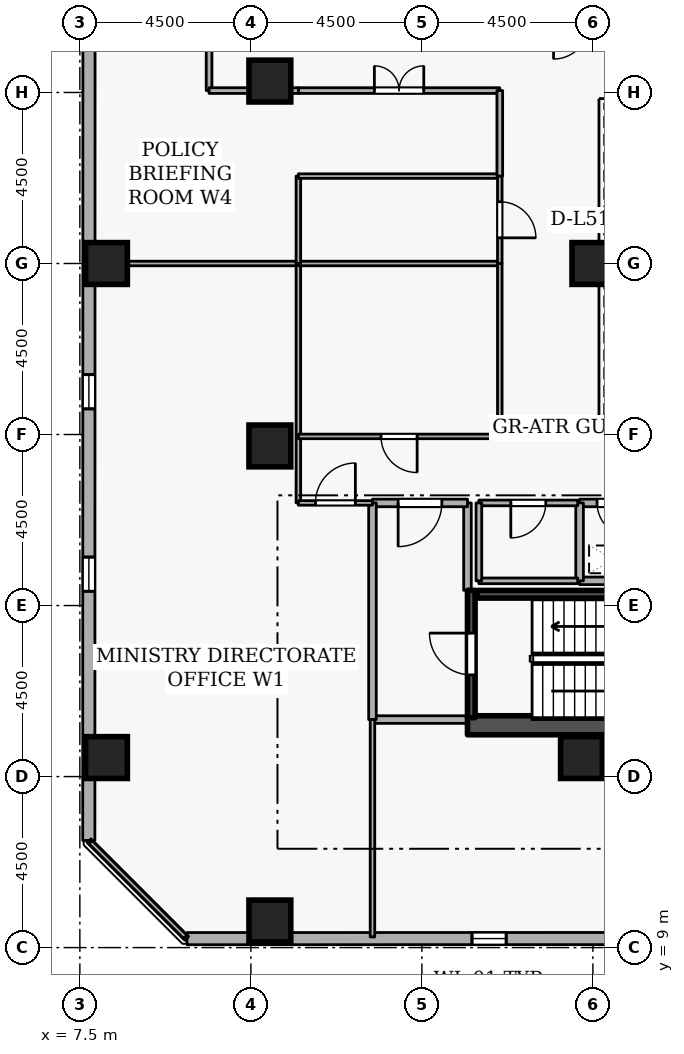
"""IFC4 building model, lengths in metres.
Left out: names, types, materials, properties, quantities, classifications, styles, units other than length and angle.
Written with IfcOpenShell. Run it as: python <this file> out.ifc"""

import sys

from ifc_helpers import new_model, si_unit, direction, frame, frame_2d, origin, origin_2d, place, context, subcontext, project, spatial, rectangle, extrude, element, fill, save


model = new_model("IFC4")
c1 = context("Model", 3, precision=1e-05, world=origin(), true_north=direction((0.0, 1.0)))
c2 = subcontext(c1, "Body", "Model", "MODEL_VIEW")
j1 = project(units=[si_unit("LENGTHUNIT", "METRE"), si_unit("PLANEANGLEUNIT", "RADIAN")], contexts=[c1])
p1 = place(None, origin())
s1 = spatial("IfcSite", under=j1, at=p1, CompositionType="ELEMENT")
p2 = place(p1, origin())
s2 = spatial("IfcBuilding", under=s1, at=p2, CompositionType="ELEMENT")
p3 = place(p2, frame((0.0, 0.0, 192.9)))
s3 = spatial("IfcBuildingStorey", under=s2, at=p3, CompositionType="ELEMENT", Elevation=192.9)
p4 = place(p3, frame((17.7, 14.85, 0.0), z_axis=(0.0, 0.0, 1.0), x_axis=(1.0, 0.0, 0.0)))
e1 = element("IfcWall", 1, at=p4, inside=s3, PredefinedType="SHEAR", context=c2, shape_type="SweptSolid", body=[
    extrude(rectangle(XDim=15.6, YDim=0.5, at=frame_2d((7.8, 0.0))), origin(), (0.0, 0.0, 1.0), 3.6),
])
for number, where, z_axis, x_axis in (
    (2, (12.5, 9.7, 0.0), (0.0, 0.0, 1.0), (1.0, 0.0, 0.0)),
    (3, (8.2, 14.0, 0.0), (0.0, 0.0, 1.0), (1.0, 0.0, 0.0)),
    (4, (8.2, 27.0, 0.0), (0.0, 0.0, 1.0), (1.0, 0.0, 0.0)),
    (5, (12.5, 22.2, 0.0), (0.0, 0.0, 1.0), (1.0, 0.0, 0.0)),
    (6, (12.5, 31.8, 0.0), (0.0, 0.0, 1.0), (1.0, 0.0, 0.0)),
    (7, (20.7, 14.0, 0.0), (0.0, 0.0, 1.0), (1.0, 0.0, 0.0)),
    (8, (21.0, 27.0, 0.0), (0.0, 0.0, 1.0), (1.0, 0.0, 0.0)),
):
    element("IfcColumn", number, at=place(p3, frame(where, z_axis=z_axis, x_axis=x_axis)), inside=s3, PredefinedType="COLUMN", context=c2, shape_type="SweptSolid", body=[
        extrude(rectangle(XDim=1.1, YDim=1.1, at=origin_2d()), origin(), (0.0, 0.0, 1.0), 3.6),
    ])
p5 = place(p3, frame((10.319, 9.235, 0.0), z_axis=(0.0, 0.0, 1.0), x_axis=(0.99999997701, 0.000214431216, 0.0)))
e9 = element("IfcWall", 9, at=p5, inside=s3, PredefinedType="STANDARD", context=c2, shape_type="SweptSolid", body=[
    extrude(rectangle(XDim=34.156, YDim=0.32, at=frame_2d((17.078, 0.0))), origin(), (0.0, 0.0, 1.0), 2.7),
])
p6 = place(p5, frame((7.5, 0.0, 0.72)))
e10 = element("IfcOpeningElement", 10, at=p6, cuts=e9, PredefinedType="OPENING", context=c2, shape_type="SweptSolid", body=[
    extrude(rectangle(XDim=0.9, YDim=1.75, at=frame_2d((0.45, 0.875))), frame((0.0, 0.17, 0.0), z_axis=(0.0, -1.0, 0.0), x_axis=(1.0, 0.0, 0.0)), (0.0, 0.0, 1.0), 0.34),
])
p7 = place(p5, frame((12.3, 0.0, 0.72)))
e11 = element("IfcOpeningElement", 11, at=p7, cuts=e9, PredefinedType="OPENING", context=c2, shape_type="SweptSolid", body=[
    extrude(rectangle(XDim=0.9, YDim=1.75, at=frame_2d((0.45, 0.875))), frame((0.0, 0.17, 0.0), z_axis=(0.0, -1.0, 0.0), x_axis=(1.0, 0.0, 0.0)), (0.0, 0.0, 1.0), 0.34),
])
p8 = place(p5, frame((17.1, 0.0, 0.72)))
e12 = element("IfcOpeningElement", 12, at=p8, cuts=e9, PredefinedType="OPENING", context=c2, shape_type="SweptSolid", body=[
    extrude(rectangle(XDim=0.9, YDim=1.75, at=frame_2d((0.45, 0.875))), frame((0.0, 0.17, 0.0), z_axis=(0.0, -1.0, 0.0), x_axis=(1.0, 0.0, 0.0)), (0.0, 0.0, 1.0), 0.34),
])
p9 = place(p5, frame((21.9, 0.0, 0.72)))
e13 = element("IfcOpeningElement", 13, at=p9, cuts=e9, PredefinedType="OPENING", context=c2, shape_type="SweptSolid", body=[
    extrude(rectangle(XDim=0.9, YDim=1.75, at=frame_2d((0.45, 0.875))), frame((0.0, 0.17, 0.0), z_axis=(0.0, -1.0, 0.0), x_axis=(1.0, 0.0, 0.0)), (0.0, 0.0, 1.0), 0.34),
])
p10 = place(p5, frame((31.5, 0.0, 0.72)))
e14 = element("IfcOpeningElement", 14, at=p10, cuts=e9, PredefinedType="OPENING", context=c2, shape_type="SweptSolid", body=[
    extrude(rectangle(XDim=0.9, YDim=1.75, at=frame_2d((0.45, 0.875))), frame((0.0, 0.17, 0.0), z_axis=(0.0, -1.0, 0.0), x_axis=(1.0, 0.0, 0.0)), (0.0, 0.0, 1.0), 0.34),
])
p11 = place(p3, frame((7.743, 45.975, 0.0), z_axis=(0.0, 0.0, 1.0), x_axis=(-0.000214431216, -0.99999997701, 0.0)))
e15 = element("IfcWall", 15, at=p11, inside=s3, PredefinedType="STANDARD", context=c2, shape_type="SweptSolid", body=[
    extrude(rectangle(XDim=34.156, YDim=0.32, at=frame_2d((17.078, 0.0))), origin(), (0.0, 0.0, 1.0), 2.7),
])
p12 = place(p11, frame((2.7, 0.0, 0.72)))
e16 = element("IfcOpeningElement", 16, at=p12, cuts=e15, PredefinedType="OPENING", context=c2, shape_type="SweptSolid", body=[
    extrude(rectangle(XDim=0.9, YDim=1.75, at=frame_2d((0.45, 0.875))), frame((0.0, 0.17, 0.0), z_axis=(0.0, -1.0, 0.0), x_axis=(1.0, 0.0, 0.0)), (0.0, 0.0, 1.0), 0.34),
])
p13 = place(p11, frame((7.5, 0.0, 0.72)))
e17 = element("IfcOpeningElement", 17, at=p13, cuts=e15, PredefinedType="OPENING", context=c2, shape_type="SweptSolid", body=[
    extrude(rectangle(XDim=0.9, YDim=1.75, at=frame_2d((0.45, 0.875))), frame((0.0, 0.17, 0.0), z_axis=(0.0, -1.0, 0.0), x_axis=(1.0, 0.0, 0.0)), (0.0, 0.0, 1.0), 0.34),
])
p14 = place(p11, frame((12.3, 0.0, 0.72)))
e18 = element("IfcOpeningElement", 18, at=p14, cuts=e15, PredefinedType="OPENING", context=c2, shape_type="SweptSolid", body=[
    extrude(rectangle(XDim=0.9, YDim=1.75, at=frame_2d((0.45, 0.875))), frame((0.0, 0.17, 0.0), z_axis=(0.0, -1.0, 0.0), x_axis=(1.0, 0.0, 0.0)), (0.0, 0.0, 1.0), 0.34),
])
p15 = place(p11, frame((21.9, 0.0, 0.72)))
e19 = element("IfcOpeningElement", 19, at=p15, cuts=e15, PredefinedType="OPENING", context=c2, shape_type="SweptSolid", body=[
    extrude(rectangle(XDim=0.9, YDim=1.75, at=frame_2d((0.45, 0.875))), frame((0.0, 0.17, 0.0), z_axis=(0.0, -1.0, 0.0), x_axis=(1.0, 0.0, 0.0)), (0.0, 0.0, 1.0), 0.34),
])
p16 = place(p11, frame((26.7, 0.0, 0.72)))
e20 = element("IfcOpeningElement", 20, at=p16, cuts=e15, PredefinedType="OPENING", context=c2, shape_type="SweptSolid", body=[
    extrude(rectangle(XDim=0.9, YDim=1.75, at=frame_2d((0.45, 0.875))), frame((0.0, 0.17, 0.0), z_axis=(0.0, -1.0, 0.0), x_axis=(1.0, 0.0, 0.0)), (0.0, 0.0, 1.0), 0.34),
])
p17 = place(p3, frame((17.8, 15.05, 0.0), z_axis=(0.0, 0.0, 1.0), x_axis=(0.0, 1.0, 0.0)))
e21 = element("IfcWall", 21, at=p17, inside=s3, PredefinedType="SHEAR", context=c2, shape_type="SweptSolid", body=[
    extrude(rectangle(XDim=3.35, YDim=0.2, at=frame_2d((1.675, 0.0))), origin(), (0.0, 0.0, 1.0), 3.6),
])
p18 = place(p17, frame((1.125, 0.0, 0.0)))
e22 = element("IfcOpeningElement", 22, at=p18, cuts=e21, PredefinedType="OPENING", context=c2, shape_type="SweptSolid", body=[
    extrude(rectangle(XDim=1.1, YDim=2.1, at=frame_2d((0.55, 1.05))), frame((0.0, 0.11, 0.0), z_axis=(0.0, -1.0, 0.0), x_axis=(1.0, 0.0, 0.0)), (0.0, 0.0, 1.0), 0.22),
])
p19 = place(p3, frame((25.05, 18.297, 0.0), z_axis=(0.0, 0.0, 1.0), x_axis=(-1.0, 0.0, 0.0)))
e23 = element("IfcWall", 23, at=p19, inside=s3, PredefinedType="SHEAR", context=c2, shape_type="SweptSolid", body=[
    extrude(rectangle(XDim=7.1, YDim=0.2, at=frame_2d((3.55, 0.0))), origin(), (0.0, 0.0, 1.0), 3.6),
])
p20 = place(p3, frame((15.2, 15.0, 0.0), z_axis=(0.0, 0.0, 1.0), x_axis=(1.0, 0.0, 0.0)))
e24 = element("IfcWall", 24, at=p20, inside=s3, PredefinedType="STANDARD", context=c2, shape_type="SweptSolid", body=[
    extrude(rectangle(XDim=2.5, YDim=0.2, at=frame_2d((1.25, 0.0))), origin(), (0.0, 0.0, 1.0), 3.34),
])
p21 = place(p3, frame((17.7, 18.4, 0.0), z_axis=(0.0, 0.0, 1.0), x_axis=(0.0, 1.0, 0.0)))
e25 = element("IfcWall", 25, at=p21, inside=s3, PredefinedType="STANDARD", context=c2, shape_type="SweptSolid", body=[
    extrude(rectangle(XDim=2.3, YDim=0.2, at=frame_2d((1.15, 0.0))), origin(), (0.0, 0.0, 1.0), 2.545),
])
p22 = place(p3, frame((17.7, 20.7, 0.0), z_axis=(0.0, 0.0, 1.0), x_axis=(-1.0, 0.0, 0.0)))
e26 = element("IfcWall", 26, at=p22, inside=s3, PredefinedType="STANDARD", context=c2, shape_type="SweptSolid", body=[
    extrude(rectangle(XDim=2.5, YDim=0.2, at=frame_2d((1.25, 0.0))), origin(), (0.0, 0.0, 1.0), 3.34),
])
p23 = place(p22, frame((0.675, 0.0, 0.0)))
e27 = element("IfcOpeningElement", 27, at=p23, cuts=e26, PredefinedType="OPENING", context=c2, shape_type="SweptSolid", body=[
    extrude(rectangle(XDim=1.15, YDim=2.1, at=frame_2d((0.575, 1.05))), frame((0.0, 0.11, 0.0), z_axis=(0.0, -1.0, 0.0), x_axis=(1.0, 0.0, 0.0)), (0.0, 0.0, 1.0), 0.22),
])
p24 = place(p3, frame((15.2, 20.7, 0.0), z_axis=(0.0, 0.0, 1.0), x_axis=(0.0, -1.0, 0.0)))
e28 = element("IfcWall", 28, at=p24, inside=s3, PredefinedType="STANDARD", context=c2, shape_type="SweptSolid", body=[
    extrude(rectangle(XDim=5.7, YDim=0.2, at=frame_2d((2.85, 0.0))), origin(), (0.0, 0.0, 1.0), 3.34),
])
p25 = place(p3, frame((20.65, 18.65, 0.0), z_axis=(0.0, 0.0, 1.0), x_axis=(1.0, 0.0, 0.0)))
e29 = element("IfcWall", 29, at=p25, inside=s3, PredefinedType="STANDARD", context=c2, shape_type="SweptSolid", body=[
    extrude(rectangle(XDim=1.8, YDim=0.2, at=frame_2d((0.9, 0.0))), origin(), (0.0, 0.0, 1.0), 3.34),
])
p26 = place(p3, frame((22.45, 20.7, 0.0), z_axis=(0.0, 0.0, 1.0), x_axis=(-1.0, 0.0, 0.0)))
e30 = element("IfcWall", 30, at=p26, inside=s3, PredefinedType="STANDARD", context=c2, shape_type="SweptSolid", body=[
    extrude(rectangle(XDim=1.8, YDim=0.2, at=frame_2d((0.9, 0.0))), origin(), (0.0, 0.0, 1.0), 3.34),
])
p27 = place(p26, frame((0.46, 0.0, 0.0)))
e31 = element("IfcOpeningElement", 31, at=p27, cuts=e30, PredefinedType="OPENING", context=c2, shape_type="SweptSolid", body=[
    extrude(rectangle(XDim=0.88, YDim=2.04, at=frame_2d((0.44, 1.02))), frame((0.0, 0.11, 0.0), z_axis=(0.0, -1.0, 0.0), x_axis=(1.0, 0.0, 0.0)), (0.0, 0.0, 1.0), 0.22),
])
p28 = place(p3, frame((20.65, 20.7, 0.0), z_axis=(0.0, 0.0, 1.0), x_axis=(0.0, -1.0, 0.0)))
e32 = element("IfcWall", 32, at=p28, inside=s3, PredefinedType="STANDARD", context=c2, shape_type="SweptSolid", body=[
    extrude(rectangle(XDim=2.05, YDim=0.2, at=frame_2d((1.025, 0.0))), origin(), (0.0, 0.0, 1.0), 3.34),
])
p29 = place(p3, frame((18.0, 18.65, 0.0), z_axis=(0.0, 0.0, 1.0), x_axis=(1.0, 0.0, 0.0)))
e33 = element("IfcWall", 33, at=p29, inside=s3, PredefinedType="PARTITIONING", context=c2, shape_type="SweptSolid", body=[
    extrude(rectangle(XDim=2.6, YDim=0.15, at=frame_2d((1.3, 0.0))), origin(), (0.0, 0.0, 1.0), 3.34),
])
p30 = place(p3, frame((20.6, 20.7, 0.0), z_axis=(0.0, 0.0, 1.0), x_axis=(-1.0, 0.0, 0.0)))
e34 = element("IfcWall", 34, at=p30, inside=s3, PredefinedType="PARTITIONING", context=c2, shape_type="SweptSolid", body=[
    extrude(rectangle(XDim=2.6, YDim=0.15, at=frame_2d((1.3, 0.0))), origin(), (0.0, 0.0, 1.0), 3.34),
])
p31 = place(p30, frame((0.84, 0.0, 0.0)))
e35 = element("IfcOpeningElement", 35, at=p31, cuts=e34, PredefinedType="OPENING", context=c2, shape_type="SweptSolid", body=[
    extrude(rectangle(XDim=0.92, YDim=2.08, at=frame_2d((0.46, 1.04))), frame((0.0, 0.085, 0.0), z_axis=(0.0, -1.0, 0.0), x_axis=(1.0, 0.0, 0.0)), (0.0, 0.0, 1.0), 0.17),
])
p32 = place(p3, frame((18.0, 20.7, 0.0), z_axis=(0.0, 0.0, 1.0), x_axis=(0.0, -1.0, 0.0)))
e36 = element("IfcWall", 36, at=p32, inside=s3, PredefinedType="PARTITIONING", context=c2, shape_type="SweptSolid", body=[
    extrude(rectangle(XDim=2.05, YDim=0.15, at=frame_2d((1.025, 0.0))), origin(), (0.0, 0.0, 1.0), 2.545),
])
p33 = place(p3, frame((8.2, 27.0, 0.0), z_axis=(0.0, 0.0, 1.0), x_axis=(1.0, 0.0, 0.0)))
e37 = element("IfcWall", 37, at=p33, inside=s3, PredefinedType="PARTITIONING", context=c2, shape_type="SweptSolid", body=[
    extrude(rectangle(XDim=5.05, YDim=0.12, at=frame_2d((2.525, 0.0))), origin(), (0.0, 0.0, 1.0), 2.882),
])
p34 = place(p3, frame((13.25, 27.0, 0.0), z_axis=(0.0, 0.0, 1.0), x_axis=(0.0, -1.0, 0.0)))
e38 = element("IfcWall", 38, at=p34, inside=s3, PredefinedType="PARTITIONING", context=c2, shape_type="SweptSolid", body=[
    extrude(rectangle(XDim=4.55, YDim=0.12, at=frame_2d((2.275, 0.0))), origin(), (0.0, 0.0, 1.0), 3.34),
])
p35 = place(p3, frame((13.25, 22.45, 0.0), z_axis=(0.0, 0.0, 1.0), x_axis=(0.0, -1.0, 0.0)))
e39 = element("IfcWall", 39, at=p35, inside=s3, PredefinedType="PARTITIONING", context=c2, shape_type="SweptSolid", body=[
    extrude(rectangle(XDim=1.75, YDim=0.12, at=frame_2d((0.875, 0.0))), origin(), (0.0, 0.0, 1.0), 3.34),
])
p36 = place(p3, frame((13.25, 20.7, 0.0), z_axis=(0.0, 0.0, 1.0), x_axis=(1.0, 0.0, 0.0)))
e40 = element("IfcWall", 40, at=p36, inside=s3, PredefinedType="PARTITIONING", context=c2, shape_type="SweptSolid", body=[
    extrude(rectangle(XDim=1.95, YDim=0.12, at=frame_2d((0.975, 0.0))), origin(), (0.0, 0.0, 1.0), 3.34),
])
p37 = place(p36, frame((0.45, 0.0, 0.0)))
e41 = element("IfcOpeningElement", 41, at=p37, cuts=e40, PredefinedType="OPENING", context=c2, shape_type="SweptSolid", body=[
    extrude(rectangle(XDim=1.05, YDim=2.1, at=frame_2d((0.525, 1.05))), frame((0.0, 0.07, 0.0), z_axis=(0.0, -1.0, 0.0), x_axis=(1.0, 0.0, 0.0)), (0.0, 0.0, 1.0), 0.14),
])
p38 = place(p3, frame((15.2, 15.0, 0.0), z_axis=(0.0, 0.0, 1.0), x_axis=(0.0, -1.0, 0.0)))
e42 = element("IfcWall", 42, at=p38, inside=s3, PredefinedType="PARTITIONING", context=c2, shape_type="SweptSolid", body=[
    extrude(rectangle(XDim=5.72, YDim=0.12, at=frame_2d((2.86, 0.0))), origin(), (0.0, 0.0, 1.0), 3.34),
])
p39 = place(p3, frame((10.275, 9.28, 0.0), z_axis=(0.0, 0.0, 1.0), x_axis=(-0.707106781187, 0.707106781187, 0.0)))
e43 = element("IfcWall", 43, at=p39, inside=s3, PredefinedType="PARTITIONING", context=c2, shape_type="SweptSolid", body=[
    extrude(rectangle(XDim=3.528, YDim=0.12, at=frame_2d((1.764, 0.0))), origin(), (0.0, 0.0, 1.0), 3.34),
])
p40 = place(p3, frame((13.25, 27.0, 0.0), z_axis=(0.0, 0.0, 1.0), x_axis=(1.0, 0.0, 0.0)))
e44 = element("IfcWall", 44, at=p40, inside=s3, PredefinedType="PARTITIONING", context=c2, shape_type="SweptSolid", body=[
    extrude(rectangle(XDim=5.3, YDim=0.12, at=frame_2d((2.65, 0.0))), origin(), (0.0, 0.0, 1.0), 2.882),
])
p41 = place(p3, frame((18.55, 27.0, 0.0), z_axis=(0.0, 0.0, 1.0), x_axis=(0.0, -1.0, 0.0)))
e45 = element("IfcWall", 45, at=p41, inside=s3, PredefinedType="PARTITIONING", context=c2, shape_type="SweptSolid", body=[
    extrude(rectangle(XDim=4.55, YDim=0.12, at=frame_2d((2.275, 0.0))), origin(), (0.0, 0.0, 1.0), 3.34),
])
p42 = place(p3, frame((18.55, 22.45, 0.0), z_axis=(0.0, 0.0, 1.0), x_axis=(-1.0, 0.0, 0.0)))
e46 = element("IfcWall", 46, at=p42, inside=s3, PredefinedType="PARTITIONING", context=c2, shape_type="SweptSolid", body=[
    extrude(rectangle(XDim=5.3, YDim=0.12, at=frame_2d((2.65, 0.0))), origin(), (0.0, 0.0, 1.0), 3.34),
])
p43 = place(p42, frame((2.175, 0.0, 0.0)))
e47 = element("IfcOpeningElement", 47, at=p43, cuts=e46, PredefinedType="OPENING", context=c2, shape_type="SweptSolid", body=[
    extrude(rectangle(XDim=0.95, YDim=2.1, at=frame_2d((0.475, 1.05))), frame((0.0, 0.07, 0.0), z_axis=(0.0, -1.0, 0.0), x_axis=(1.0, 0.0, 0.0)), (0.0, 0.0, 1.0), 0.14),
])
p44 = place(p3, frame((13.25, 27.0, 0.0), z_axis=(0.0, 0.0, 1.0), x_axis=(0.0, 1.0, 0.0)))
e48 = element("IfcWall", 48, at=p44, inside=s3, PredefinedType="PARTITIONING", context=c2, shape_type="SweptSolid", body=[
    extrude(rectangle(XDim=2.3, YDim=0.12, at=frame_2d((1.15, 0.0))), origin(), (0.0, 0.0, 1.0), 3.34),
])
p45 = place(p3, frame((13.25, 29.3, 0.0), z_axis=(0.0, 0.0, 1.0), x_axis=(1.0, 0.0, 0.0)))
e49 = element("IfcWall", 49, at=p45, inside=s3, PredefinedType="PARTITIONING", context=c2, shape_type="SweptSolid", body=[
    extrude(rectangle(XDim=5.3, YDim=0.12, at=frame_2d((2.65, 0.0))), origin(), (0.0, 0.0, 1.0), 3.34),
])
p46 = place(p3, frame((18.55, 29.3, 0.0), z_axis=(0.0, 0.0, 1.0), x_axis=(0.0, -1.0, 0.0)))
e50 = element("IfcWall", 50, at=p46, inside=s3, PredefinedType="PARTITIONING", context=c2, shape_type="SweptSolid", body=[
    extrude(rectangle(XDim=2.3, YDim=0.12, at=frame_2d((1.15, 0.0))), origin(), (0.0, 0.0, 1.0), 3.34),
])
p47 = place(p46, frame((0.675, 0.0, 0.0)))
e51 = element("IfcOpeningElement", 51, at=p47, cuts=e50, PredefinedType="OPENING", context=c2, shape_type="SweptSolid", body=[
    extrude(rectangle(XDim=0.95, YDim=2.1, at=frame_2d((0.475, 1.05))), frame((0.0, 0.07, 0.0), z_axis=(0.0, -1.0, 0.0), x_axis=(1.0, 0.0, 0.0)), (0.0, 0.0, 1.0), 0.14),
])
p48 = place(p3, frame((13.25, 31.55, 0.0), z_axis=(0.0, 0.0, 1.0), x_axis=(1.0, 0.0, 0.0)))
e52 = element("IfcWall", 52, at=p48, inside=s3, PredefinedType="PARTITIONING", context=c2, shape_type="SweptSolid", body=[
    extrude(rectangle(XDim=5.3, YDim=0.15, at=frame_2d((2.65, 0.0))), origin(), (0.0, 0.0, 1.0), 3.34),
])
p49 = place(p48, frame((2.0, 0.0, 0.0)))
e53 = element("IfcOpeningElement", 53, at=p49, cuts=e52, PredefinedType="OPENING", context=c2, shape_type="SweptSolid", body=[
    extrude(rectangle(XDim=1.3, YDim=2.12, at=frame_2d((0.65, 1.06))), frame((0.0, 0.085, 0.0), z_axis=(0.0, -1.0, 0.0), x_axis=(1.0, 0.0, 0.0)), (0.0, 0.0, 1.0), 0.17),
])
p50 = place(p3, frame((18.55, 31.55, 0.0), z_axis=(0.0, 0.0, 1.0), x_axis=(0.0, -1.0, 0.0)))
e54 = element("IfcWall", 54, at=p50, inside=s3, PredefinedType="PARTITIONING", context=c2, shape_type="SweptSolid", body=[
    extrude(rectangle(XDim=2.25, YDim=0.15, at=frame_2d((1.125, 0.0))), origin(), (0.0, 0.0, 1.0), 3.34),
])
p51 = place(p3, frame((10.9, 33.862, 0.0), z_axis=(0.0, 0.0, 1.0), x_axis=(0.0, -1.0, 0.0)))
e55 = element("IfcWall", 55, at=p51, inside=s3, PredefinedType="PARTITIONING", context=c2, shape_type="SweptSolid", body=[
    extrude(rectangle(XDim=2.312, YDim=0.15, at=frame_2d((1.156, 0.0))), origin(), (0.0, 0.0, 1.0), 3.34),
])
p52 = place(p3, frame((10.9, 31.55, 0.0), z_axis=(0.0, 0.0, 1.0), x_axis=(1.0, 0.0, 0.0)))
e56 = element("IfcWall", 56, at=p52, inside=s3, PredefinedType="PARTITIONING", context=c2, shape_type="SweptSolid", body=[
    extrude(rectangle(XDim=2.35, YDim=0.15, at=frame_2d((1.175, 0.0))), origin(), (0.0, 0.0, 1.0), 3.34),
])
p53 = place(p6, origin())
e57 = element("IfcWindow", 57, at=p53, inside=s3, PartitioningType="SINGLE_PANEL", PredefinedType="WINDOW", context=c2, shape_type="SweptSolid", body=[
    extrude(rectangle(XDim=0.9, YDim=1.75, at=frame_2d((0.45, 0.875))), frame((0.0, 0.03, 0.0), z_axis=(0.0, -1.0, 0.0), x_axis=(1.0, 0.0, 0.0)), (0.0, 0.0, 1.0), 0.06),
])
fill(e10, e57)
p54 = place(p15, origin())
e58 = element("IfcWindow", 58, at=p54, inside=s3, PartitioningType="SINGLE_PANEL", PredefinedType="WINDOW", context=c2, shape_type="SweptSolid", body=[
    extrude(rectangle(XDim=0.9, YDim=1.75, at=frame_2d((0.45, 0.875))), frame((0.0, 0.03, 0.0), z_axis=(0.0, -1.0, 0.0), x_axis=(1.0, 0.0, 0.0)), (0.0, 0.0, 1.0), 0.06),
])
fill(e19, e58)
p55 = place(p16, origin())
e59 = element("IfcWindow", 59, at=p55, inside=s3, PartitioningType="SINGLE_PANEL", PredefinedType="WINDOW", context=c2, shape_type="SweptSolid", body=[
    extrude(rectangle(XDim=0.9, YDim=1.75, at=frame_2d((0.45, 0.875))), frame((0.0, 0.03, 0.0), z_axis=(0.0, -1.0, 0.0), x_axis=(1.0, 0.0, 0.0)), (0.0, 0.0, 1.0), 0.06),
])
fill(e20, e59)
p56 = place(p18, origin())
e60 = element("IfcDoor", 60, at=p56, inside=s3, OperationType="SINGLE_SWING_RIGHT", PredefinedType="DOOR", context=c2, shape_type="SweptSolid", body=[
    extrude(rectangle(XDim=1.1, YDim=2.1, at=frame_2d((0.55, 1.05))), frame((0.0, 0.025, 0.0), z_axis=(0.0, -1.0, 0.0), x_axis=(1.0, 0.0, 0.0)), (0.0, 0.0, 1.0), 0.05),
])
fill(e22, e60)
p57 = place(p23, origin())
e61 = element("IfcDoor", 61, at=p57, inside=s3, OperationType="SINGLE_SWING_RIGHT", PredefinedType="DOOR", context=c2, shape_type="SweptSolid", body=[
    extrude(rectangle(XDim=1.15, YDim=2.1, at=frame_2d((0.575, 1.05))), frame((0.0, 0.025, 0.0), z_axis=(0.0, -1.0, 0.0), x_axis=(1.0, 0.0, 0.0)), (0.0, 0.0, 1.0), 0.05),
])
fill(e27, e61)
p58 = place(p27, origin())
e62 = element("IfcDoor", 62, at=p58, inside=s3, OperationType="SINGLE_SWING_LEFT", PredefinedType="DOOR", context=c2, shape_type="SweptSolid", body=[
    extrude(rectangle(XDim=0.88, YDim=2.04, at=frame_2d((0.44, 1.02))), frame((0.0, 0.025, 0.0), z_axis=(0.0, -1.0, 0.0), x_axis=(1.0, 0.0, 0.0)), (0.0, 0.0, 1.0), 0.05),
])
fill(e31, e62)
p59 = place(p31, origin())
e63 = element("IfcDoor", 63, at=p59, inside=s3, OperationType="SINGLE_SWING_RIGHT", PredefinedType="DOOR", context=c2, shape_type="SweptSolid", body=[
    extrude(rectangle(XDim=0.92, YDim=2.08, at=frame_2d((0.46, 1.04))), frame((0.0, 0.025, 0.0), z_axis=(0.0, -1.0, 0.0), x_axis=(1.0, 0.0, 0.0)), (0.0, 0.0, 1.0), 0.05),
])
fill(e35, e63)
p60 = place(p37, origin())
e64 = element("IfcDoor", 64, at=p60, inside=s3, OperationType="SINGLE_SWING_RIGHT", PredefinedType="DOOR", context=c2, shape_type="SweptSolid", body=[
    extrude(rectangle(XDim=1.05, YDim=2.1, at=frame_2d((0.525, 1.05))), frame((0.0, 0.025, 0.0), z_axis=(0.0, -1.0, 0.0), x_axis=(1.0, 0.0, 0.0)), (0.0, 0.0, 1.0), 0.05),
])
fill(e41, e64)
p61 = place(p43, origin())
e65 = element("IfcDoor", 65, at=p61, inside=s3, OperationType="SINGLE_SWING_LEFT", PredefinedType="DOOR", context=c2, shape_type="SweptSolid", body=[
    extrude(rectangle(XDim=0.95, YDim=2.1, at=frame_2d((0.475, 1.05))), frame((0.0, 0.025, 0.0), z_axis=(0.0, -1.0, 0.0), x_axis=(1.0, 0.0, 0.0)), (0.0, 0.0, 1.0), 0.05),
])
fill(e47, e65)
p62 = place(p47, origin())
e66 = element("IfcDoor", 66, at=p62, inside=s3, OperationType="SINGLE_SWING_RIGHT", PredefinedType="DOOR", context=c2, shape_type="SweptSolid", body=[
    extrude(rectangle(XDim=0.95, YDim=2.1, at=frame_2d((0.475, 1.05))), frame((0.0, 0.025, 0.0), z_axis=(0.0, -1.0, 0.0), x_axis=(1.0, 0.0, 0.0)), (0.0, 0.0, 1.0), 0.05),
])
fill(e51, e66)
p63 = place(p49, origin())
e67 = element("IfcDoor", 67, at=p63, inside=s3, OperationType="DOUBLE_DOOR_SINGLE_SWING", PredefinedType="DOOR", context=c2, shape_type="SweptSolid", body=[
    extrude(rectangle(XDim=1.3, YDim=2.12, at=frame_2d((0.65, 1.06))), frame((0.0, 0.025, 0.0), z_axis=(0.0, -1.0, 0.0), x_axis=(1.0, 0.0, 0.0)), (0.0, 0.0, 1.0), 0.05),
])
fill(e53, e67)
save(model, sys.argv[1])
